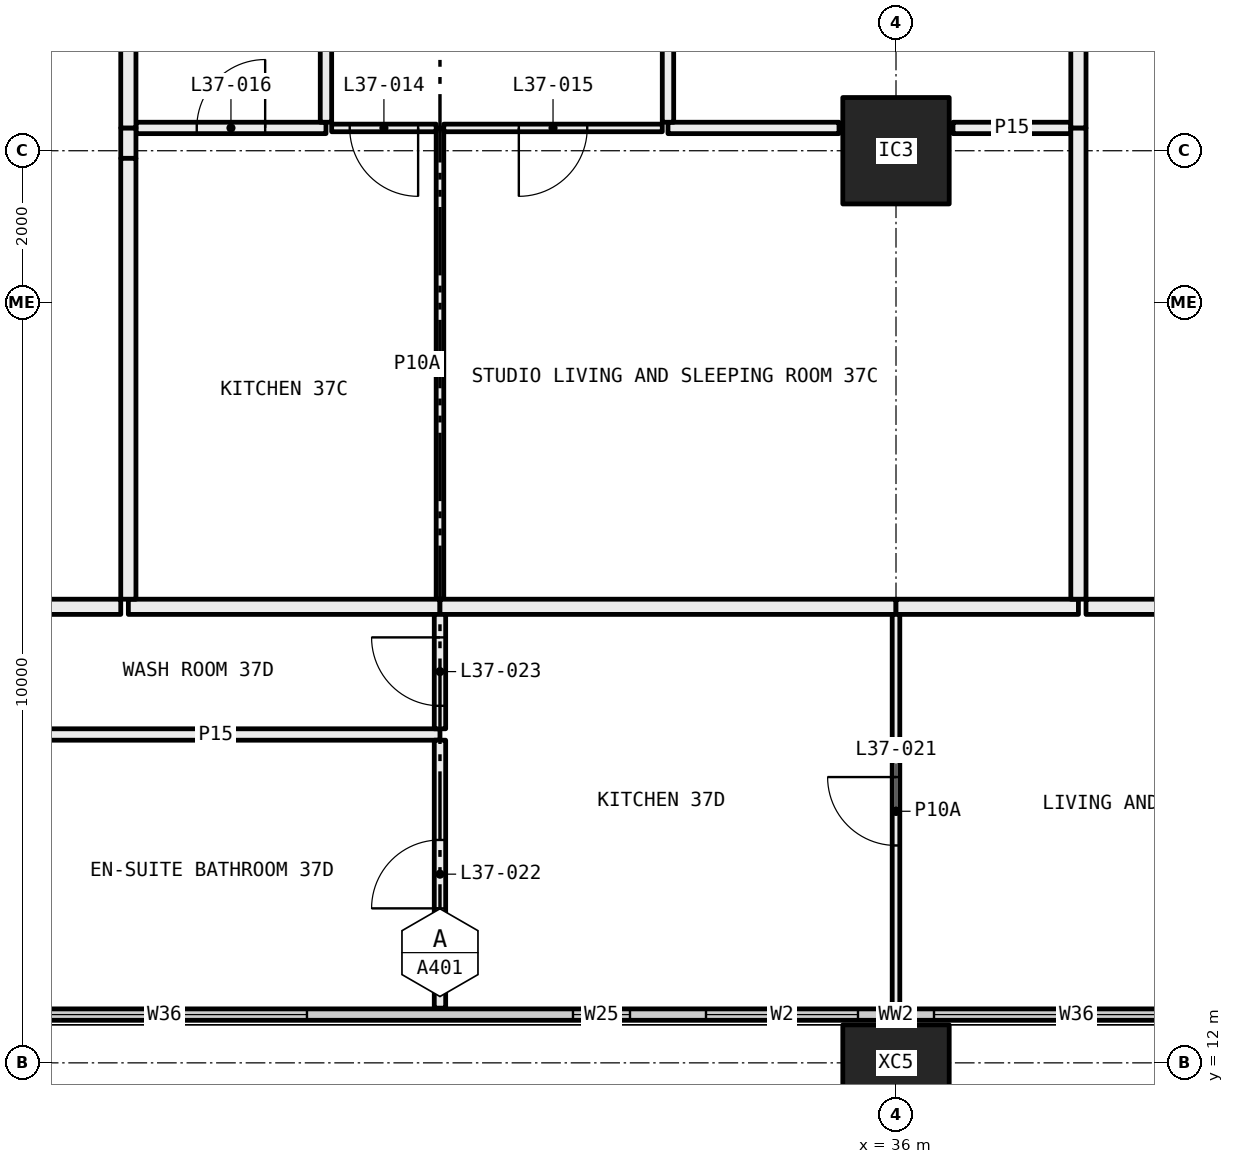
"""IFC4 building model, lengths in metres.
Left out: names, types, materials, properties, quantities, classifications, styles, units other than length and angle.
Written with IfcOpenShell. Run it as: python <this file> out.ifc"""

import sys

from ifc_helpers import new_model, si_unit, direction, frame, frame_2d, origin, origin_2d, place, context, subcontext, project, spatial, rectangle, hollow_rectangle, extrude, element, fill, save


model = new_model("IFC4")
c1 = context("Model", 3, precision=1e-05, world=origin(), true_north=direction((0.0, 1.0)))
c2 = subcontext(c1, "Body", "Model", "MODEL_VIEW")
j1 = project(units=[si_unit("LENGTHUNIT", "METRE"), si_unit("PLANEANGLEUNIT", "RADIAN")], contexts=[c1])
p1 = place(None, origin())
s1 = spatial("IfcSite", under=j1, at=p1, CompositionType="ELEMENT")
p2 = place(p1, origin())
s2 = spatial("IfcBuilding", under=s1, at=p2, CompositionType="ELEMENT")
p3 = place(p2, frame((0.0, 0.0, 141.45)))
s3 = spatial("IfcBuildingStorey", under=s2, at=p3, CompositionType="ELEMENT", Elevation=141.45)
p4 = place(p3, frame((36.0, 12.0, -0.4), z_axis=(0.0, 0.0, 1.0), x_axis=(1.0, 0.0, 0.0)))
e1 = element("IfcColumn", 1, at=p4, inside=s3, PredefinedType="COLUMN", context=c2, shape_type="SweptSolid", body=[
    extrude(hollow_rectangle(XDim=1.4, YDim=1.0, WallThickness=0.055, at=origin_2d()), origin(), (0.0, 0.0, 1.0), 3.45),
])
p5 = place(p3, frame((36.0, 24.0, 0.0), z_axis=(0.0, 0.0, 1.0), x_axis=(1.0, 0.0, 0.0)))
e2 = element("IfcColumn", 2, at=p5, inside=s3, PredefinedType="COLUMN", context=c2, shape_type="SweptSolid", body=[
    extrude(hollow_rectangle(XDim=1.4, YDim=1.4, WallThickness=0.06, at=origin_2d()), origin(), (0.0, 0.0, 1.0), 3.05),
])
p6 = place(p3, frame((6.56, 12.635, 0.0), z_axis=(0.0, 0.0, 1.0), x_axis=(1.0, 0.0, 0.0)))
e3 = element("IfcWall", 3, at=p6, inside=s3, PredefinedType="ELEMENTEDWALL", context=c2, shape_type="SweptSolid", body=[
    extrude(rectangle(XDim=58.88, YDim=0.15, at=frame_2d((29.44, 0.0))), origin(), (0.0, 0.0, 1.0), 3.05),
])
p7 = place(p6, frame((0.44, 0.0, 0.45)))
e4 = element("IfcOpeningElement", 4, at=p7, cuts=e3, PredefinedType="OPENING", context=c2, shape_type="SweptSolid", body=[
    extrude(rectangle(XDim=4.5, YDim=2.55, at=frame_2d((2.25, 1.275))), frame((0.0, 0.085, 0.0), z_axis=(0.0, -1.0, 0.0), x_axis=(1.0, 0.0, 0.0)), (0.0, 0.0, 1.0), 0.17),
])
p8 = place(p6, frame((5.94, 0.0, 0.45)))
e5 = element("IfcOpeningElement", 5, at=p8, cuts=e3, PredefinedType="OPENING", context=c2, shape_type="SweptSolid", body=[
    extrude(rectangle(XDim=3.75, YDim=2.55, at=frame_2d((1.875, 1.275))), frame((0.0, 0.085, 0.0), z_axis=(0.0, -1.0, 0.0), x_axis=(1.0, 0.0, 0.0)), (0.0, 0.0, 1.0), 0.17),
])
p9 = place(p6, frame((13.19, 0.0, 0.45)))
e6 = element("IfcOpeningElement", 6, at=p9, cuts=e3, PredefinedType="OPENING", context=c2, shape_type="SweptSolid", body=[
    extrude(rectangle(XDim=3.75, YDim=2.55, at=frame_2d((1.875, 1.275))), frame((0.0, 0.085, 0.0), z_axis=(0.0, -1.0, 0.0), x_axis=(1.0, 0.0, 0.0)), (0.0, 0.0, 1.0), 0.17),
])
p10 = place(p6, frame((17.94, 0.0, 0.45)))
e7 = element("IfcOpeningElement", 7, at=p10, cuts=e3, PredefinedType="OPENING", context=c2, shape_type="SweptSolid", body=[
    extrude(rectangle(XDim=3.75, YDim=2.55, at=frame_2d((1.875, 1.275))), frame((0.0, 0.085, 0.0), z_axis=(0.0, -1.0, 0.0), x_axis=(1.0, 0.0, 0.0)), (0.0, 0.0, 1.0), 0.17),
])
p11 = place(p6, frame((25.19, 0.0, 0.45)))
e8 = element("IfcOpeningElement", 8, at=p11, cuts=e3, PredefinedType="OPENING", context=c2, shape_type="SweptSolid", body=[
    extrude(rectangle(XDim=0.75, YDim=2.55, at=frame_2d((0.375, 1.275))), frame((0.0, 0.085, 0.0), z_axis=(0.0, -1.0, 0.0), x_axis=(1.0, 0.0, 0.0)), (0.0, 0.0, 1.0), 0.17),
])
p12 = place(p6, frame((26.94, 0.0, 0.45)))
e9 = element("IfcOpeningElement", 9, at=p12, cuts=e3, PredefinedType="OPENING", context=c2, shape_type="SweptSolid", body=[
    extrude(rectangle(XDim=2.0, YDim=2.55, at=frame_2d((1.0, 1.275))), frame((0.0, 0.085, 0.0), z_axis=(0.0, -1.0, 0.0), x_axis=(1.0, 0.0, 0.0)), (0.0, 0.0, 1.0), 0.17),
])
p13 = place(p6, frame((29.94, 0.0, 0.45)))
e10 = element("IfcOpeningElement", 10, at=p13, cuts=e3, PredefinedType="OPENING", context=c2, shape_type="SweptSolid", body=[
    extrude(rectangle(XDim=3.75, YDim=2.55, at=frame_2d((1.875, 1.275))), frame((0.0, 0.085, 0.0), z_axis=(0.0, -1.0, 0.0), x_axis=(1.0, 0.0, 0.0)), (0.0, 0.0, 1.0), 0.17),
])
p14 = place(p6, frame((37.19, 0.0, 0.45)))
e11 = element("IfcOpeningElement", 11, at=p14, cuts=e3, PredefinedType="OPENING", context=c2, shape_type="SweptSolid", body=[
    extrude(rectangle(XDim=3.75, YDim=2.55, at=frame_2d((1.875, 1.275))), frame((0.0, 0.085, 0.0), z_axis=(0.0, -1.0, 0.0), x_axis=(1.0, 0.0, 0.0)), (0.0, 0.0, 1.0), 0.17),
])
p15 = place(p6, frame((41.94, 0.0, 0.45)))
e12 = element("IfcOpeningElement", 12, at=p15, cuts=e3, PredefinedType="OPENING", context=c2, shape_type="SweptSolid", body=[
    extrude(rectangle(XDim=3.75, YDim=2.55, at=frame_2d((1.875, 1.275))), frame((0.0, 0.085, 0.0), z_axis=(0.0, -1.0, 0.0), x_axis=(1.0, 0.0, 0.0)), (0.0, 0.0, 1.0), 0.17),
])
p16 = place(p6, frame((49.19, 0.0, 0.45)))
e13 = element("IfcOpeningElement", 13, at=p16, cuts=e3, PredefinedType="OPENING", context=c2, shape_type="SweptSolid", body=[
    extrude(rectangle(XDim=0.75, YDim=2.55, at=frame_2d((0.375, 1.275))), frame((0.0, 0.085, 0.0), z_axis=(0.0, -1.0, 0.0), x_axis=(1.0, 0.0, 0.0)), (0.0, 0.0, 1.0), 0.17),
])
p17 = place(p6, frame((50.94, 0.0, 0.45)))
e14 = element("IfcOpeningElement", 14, at=p17, cuts=e3, PredefinedType="OPENING", context=c2, shape_type="SweptSolid", body=[
    extrude(rectangle(XDim=2.0, YDim=2.55, at=frame_2d((1.0, 1.275))), frame((0.0, 0.085, 0.0), z_axis=(0.0, -1.0, 0.0), x_axis=(1.0, 0.0, 0.0)), (0.0, 0.0, 1.0), 0.17),
])
p18 = place(p6, frame((53.94, 0.0, 0.45)))
e15 = element("IfcOpeningElement", 15, at=p18, cuts=e3, PredefinedType="OPENING", context=c2, shape_type="SweptSolid", body=[
    extrude(rectangle(XDim=4.5, YDim=2.55, at=frame_2d((2.25, 1.275))), frame((0.0, 0.085, 0.0), z_axis=(0.0, -1.0, 0.0), x_axis=(1.0, 0.0, 0.0)), (0.0, 0.0, 1.0), 0.17),
])
p19 = place(p3, frame((30.0, 18.1, 0.0), z_axis=(0.0, 0.0, 1.0), x_axis=(0.0, 1.0, 0.0)))
e16 = element("IfcWall", 16, at=p19, inside=s3, PredefinedType="PARTITIONING", context=c2, shape_type="SweptSolid", body=[
    extrude(rectangle(XDim=6.2, YDim=0.1, at=frame_2d((3.1, 0.0))), origin(), (0.0, 0.0, 1.0), 2.45),
])
p20 = place(p3, frame((28.5, 24.3, 0.0), z_axis=(0.0, 0.0, 1.0), x_axis=(-1.0, 0.0, 0.0)))
e17 = element("IfcWall", 17, at=p20, inside=s3, PredefinedType="PARTITIONING", context=c2, shape_type="SweptSolid", body=[
    extrude(rectangle(XDim=2.5, YDim=0.15, at=frame_2d((1.25, 0.0))), origin(), (0.0, 0.0, 1.0), 3.05),
])
p21 = place(p20, frame((0.8, 0.0, 0.0)))
e18 = element("IfcOpeningElement", 18, at=p21, cuts=e17, PredefinedType="OPENING", context=c2, shape_type="SweptSolid", body=[
    extrude(rectangle(XDim=0.9, YDim=2.1, at=frame_2d((0.45, 1.05))), frame((0.0, 0.085, 0.0), z_axis=(0.0, -1.0, 0.0), x_axis=(1.0, 0.0, 0.0)), (0.0, 0.0, 1.0), 0.17),
])
p22 = place(p3, frame((29.95, 24.3, 0.0), z_axis=(0.0, 0.0, 1.0), x_axis=(-1.0, 0.0, 0.0)))
e19 = element("IfcWall", 19, at=p22, inside=s3, PredefinedType="PARTITIONING", context=c2, shape_type="SweptSolid", body=[
    extrude(rectangle(XDim=1.375, YDim=0.1, at=frame_2d((0.688, 0.0))), origin(), (0.0, 0.0, 1.0), 3.05),
])
p23 = place(p22, frame((0.238, 0.0, 0.0)))
e20 = element("IfcOpeningElement", 20, at=p23, cuts=e19, PredefinedType="OPENING", context=c2, shape_type="SweptSolid", body=[
    extrude(rectangle(XDim=0.9, YDim=2.1, at=frame_2d((0.45, 1.05))), frame((0.0, 0.06, 0.0), z_axis=(0.0, -1.0, 0.0), x_axis=(1.0, 0.0, 0.0)), (0.0, 0.0, 1.0), 0.12),
])
p24 = place(p3, frame((25.9, 18.0, 0.0), z_axis=(0.0, 0.0, 1.0), x_axis=(1.0, 0.0, 0.0)))
e21 = element("IfcWall", 21, at=p24, inside=s3, PredefinedType="PARTITIONING", context=c2, shape_type="SweptSolid", body=[
    extrude(rectangle(XDim=4.1, YDim=0.2, at=frame_2d((2.05, 0.0))), origin(), (0.0, 0.0, 1.0), 3.05),
])
p25 = place(p3, frame((25.9, 24.3, 0.0), z_axis=(0.0, 0.0, 1.0), x_axis=(0.0, -1.0, 0.0)))
e22 = element("IfcWall", 22, at=p25, inside=s3, PredefinedType="PARTITIONING", context=c2, shape_type="SweptSolid", body=[
    extrude(rectangle(XDim=0.4, YDim=0.2, at=frame_2d((0.2, 0.0))), origin(), (0.0, 0.0, 1.0), 2.45),
])
p26 = place(p3, frame((25.9, 23.9, 0.0), z_axis=(0.0, 0.0, 1.0), x_axis=(0.0, -1.0, 0.0)))
e23 = element("IfcWall", 23, at=p26, inside=s3, PredefinedType="PARTITIONING", context=c2, shape_type="SweptSolid", body=[
    extrude(rectangle(XDim=5.8, YDim=0.2, at=frame_2d((2.9, 0.0))), origin(), (0.0, 0.0, 1.0), 3.05),
])
p27 = place(p3, frame((32.925, 24.3, 0.0), z_axis=(0.0, 0.0, 1.0), x_axis=(-1.0, 0.0, 0.0)))
e24 = element("IfcWall", 24, at=p27, inside=s3, PredefinedType="PARTITIONING", context=c2, shape_type="SweptSolid", body=[
    extrude(rectangle(XDim=2.875, YDim=0.1, at=frame_2d((1.438, 0.0))), origin(), (0.0, 0.0, 1.0), 3.05),
])
p28 = place(p27, frame((0.988, 0.0, 0.0)))
e25 = element("IfcOpeningElement", 25, at=p28, cuts=e24, PredefinedType="OPENING", context=c2, shape_type="SweptSolid", body=[
    extrude(rectangle(XDim=0.9, YDim=2.1, at=frame_2d((0.45, 1.05))), frame((0.0, 0.06, 0.0), z_axis=(0.0, -1.0, 0.0), x_axis=(1.0, 0.0, 0.0)), (0.0, 0.0, 1.0), 0.12),
])
p29 = place(p3, frame((35.25, 24.3, 0.0), z_axis=(0.0, 0.0, 1.0), x_axis=(-1.0, 0.0, 0.0)))
e26 = element("IfcWall", 26, at=p29, inside=s3, PredefinedType="PARTITIONING", context=c2, shape_type="SweptSolid", body=[
    extrude(rectangle(XDim=2.25, YDim=0.15, at=frame_2d((1.125, 0.0))), origin(), (0.0, 0.0, 1.0), 3.05),
])
p30 = place(p3, frame((38.3, 24.3, 0.0), z_axis=(0.0, 0.0, 1.0), x_axis=(-1.0, 0.0, 0.0)))
e27 = element("IfcWall", 27, at=p30, inside=s3, PredefinedType="PARTITIONING", context=c2, shape_type="SweptSolid", body=[
    extrude(rectangle(XDim=1.55, YDim=0.15, at=frame_2d((0.775, 0.0))), origin(), (0.0, 0.0, 1.0), 3.05),
])
p31 = place(p3, frame((30.0, 18.0, 0.0), z_axis=(0.0, 0.0, 1.0), x_axis=(1.0, 0.0, 0.0)))
e28 = element("IfcWall", 28, at=p31, inside=s3, PredefinedType="PARTITIONING", context=c2, shape_type="SweptSolid", body=[
    extrude(rectangle(XDim=6.0, YDim=0.2, at=frame_2d((3.0, 0.0))), origin(), (0.0, 0.0, 1.0), 2.45),
])
p32 = place(p3, frame((36.0, 18.0, 0.0), z_axis=(0.0, 0.0, 1.0), x_axis=(1.0, 0.0, 0.0)))
e29 = element("IfcWall", 29, at=p32, inside=s3, PredefinedType="PARTITIONING", context=c2, shape_type="SweptSolid", body=[
    extrude(rectangle(XDim=2.4, YDim=0.2, at=frame_2d((1.2, 0.0))), origin(), (0.0, 0.0, 1.0), 2.45),
])
p33 = place(p3, frame((38.4, 18.1, 0.0), z_axis=(0.0, 0.0, 1.0), x_axis=(0.0, 1.0, 0.0)))
e30 = element("IfcWall", 30, at=p33, inside=s3, PredefinedType="PARTITIONING", context=c2, shape_type="SweptSolid", body=[
    extrude(rectangle(XDim=6.2, YDim=0.2, at=frame_2d((3.1, 0.0))), origin(), (0.0, 0.0, 1.0), 2.45),
])
p34 = place(p3, frame((28.5, 24.375, 0.0), z_axis=(0.0, 0.0, 1.0), x_axis=(0.0, 1.0, 0.0)))
e31 = element("IfcWall", 31, at=p34, inside=s3, PredefinedType="PARTITIONING", context=c2, shape_type="SweptSolid", body=[
    extrude(rectangle(XDim=1.927, YDim=0.15, at=frame_2d((0.963, 0.0))), origin(), (0.0, 0.0, 1.0), 3.05),
])
p35 = place(p3, frame((25.9, 26.377, 0.0), z_axis=(0.0, 0.0, 1.0), x_axis=(0.0, -1.0, 0.0)))
e32 = element("IfcWall", 32, at=p35, inside=s3, PredefinedType="PARTITIONING", context=c2, shape_type="SweptSolid", body=[
    extrude(rectangle(XDim=2.077, YDim=0.2, at=frame_2d((1.039, 0.0))), origin(), (0.0, 0.0, 1.0), 3.05),
])
p36 = place(p3, frame((33.0, 24.375, 0.0), z_axis=(0.0, 0.0, 1.0), x_axis=(0.0, 1.0, 0.0)))
e33 = element("IfcWall", 33, at=p36, inside=s3, PredefinedType="PARTITIONING", context=c2, shape_type="SweptSolid", body=[
    extrude(rectangle(XDim=4.325, YDim=0.15, at=frame_2d((2.163, 0.0))), origin(), (0.0, 0.0, 1.0), 3.05),
])
p37 = place(p36, frame((1.712, 0.0, 0.0)))
e34 = element("IfcOpeningElement", 34, at=p37, cuts=e33, PredefinedType="OPENING", context=c2, shape_type="SweptSolid", body=[
    extrude(rectangle(XDim=0.9, YDim=2.1, at=frame_2d((0.45, 1.05))), frame((0.0, 0.085, 0.0), z_axis=(0.0, -1.0, 0.0), x_axis=(1.0, 0.0, 0.0)), (0.0, 0.0, 1.0), 0.17),
])
p38 = place(p3, frame((38.4, 24.3, 0.0), z_axis=(0.0, 0.0, 1.0), x_axis=(0.0, 1.0, 0.0)))
e35 = element("IfcWall", 35, at=p38, inside=s3, PredefinedType="PARTITIONING", context=c2, shape_type="SweptSolid", body=[
    extrude(rectangle(XDim=4.5, YDim=0.2, at=frame_2d((2.25, 0.0))), origin(), (0.0, 0.0, 1.0), 3.05),
])
p39 = place(p3, frame((30.0, 16.32, 0.0), z_axis=(0.0, 0.0, 1.0), x_axis=(-1.0, 0.0, 0.0)))
e36 = element("IfcWall", 36, at=p39, inside=s3, PredefinedType="PARTITIONING", context=c2, shape_type="SweptSolid", body=[
    extrude(rectangle(XDim=5.9, YDim=0.15, at=frame_2d((2.95, 0.0))), origin(), (0.0, 0.0, 1.0), 3.05),
])
p40 = place(p3, frame((30.0, 12.72, 0.0), z_axis=(0.0, 0.0, 1.0), x_axis=(0.0, 1.0, 0.0)))
e37 = element("IfcWall", 37, at=p40, inside=s3, PredefinedType="PARTITIONING", context=c2, shape_type="SweptSolid", body=[
    extrude(rectangle(XDim=3.525, YDim=0.15, at=frame_2d((1.763, 0.0))), origin(), (0.0, 0.0, 1.0), 3.05),
])
p41 = place(p40, frame((1.312, 0.0, 0.0)))
e38 = element("IfcOpeningElement", 38, at=p41, cuts=e37, PredefinedType="OPENING", context=c2, shape_type="SweptSolid", body=[
    extrude(rectangle(XDim=0.9, YDim=2.1, at=frame_2d((0.45, 1.05))), frame((0.0, 0.085, 0.0), z_axis=(0.0, -1.0, 0.0), x_axis=(1.0, 0.0, 0.0)), (0.0, 0.0, 1.0), 0.17),
])
p42 = place(p3, frame((30.0, 16.395, 0.0), z_axis=(0.0, 0.0, 1.0), x_axis=(0.0, 1.0, 0.0)))
e39 = element("IfcWall", 39, at=p42, inside=s3, PredefinedType="PARTITIONING", context=c2, shape_type="SweptSolid", body=[
    extrude(rectangle(XDim=1.505, YDim=0.15, at=frame_2d((0.752, 0.0))), origin(), (0.0, 0.0, 1.0), 3.05),
])
p43 = place(p42, frame((0.302, 0.0, 0.0)))
e40 = element("IfcOpeningElement", 40, at=p43, cuts=e39, PredefinedType="OPENING", context=c2, shape_type="SweptSolid", body=[
    extrude(rectangle(XDim=0.9, YDim=2.1, at=frame_2d((0.45, 1.05))), frame((0.0, 0.085, 0.0), z_axis=(0.0, -1.0, 0.0), x_axis=(1.0, 0.0, 0.0)), (0.0, 0.0, 1.0), 0.17),
])
p44 = place(p3, frame((25.8, 18.0, 0.0), z_axis=(0.0, 0.0, 1.0), x_axis=(-1.0, 0.0, 0.0)))
e41 = element("IfcWall", 41, at=p44, inside=s3, PredefinedType="PARTITIONING", context=c2, shape_type="SweptSolid", body=[
    extrude(rectangle(XDim=1.7, YDim=0.2, at=frame_2d((0.85, 0.0))), origin(), (0.0, 0.0, 1.0), 3.05),
])
p45 = place(p3, frame((36.0, 12.72, 0.0), z_axis=(0.0, 0.0, 1.0), x_axis=(0.0, 1.0, 0.0)))
e42 = element("IfcWall", 42, at=p45, inside=s3, PredefinedType="PARTITIONING", context=c2, shape_type="SweptSolid", body=[
    extrude(rectangle(XDim=5.18, YDim=0.1, at=frame_2d((2.59, 0.0))), origin(), (0.0, 0.0, 1.0), 2.45),
])
p46 = place(p45, frame((2.14, 0.0, 0.0)))
e43 = element("IfcOpeningElement", 43, at=p46, cuts=e42, PredefinedType="OPENING", context=c2, shape_type="SweptSolid", body=[
    extrude(rectangle(XDim=0.9, YDim=2.1, at=frame_2d((0.45, 1.05))), frame((0.0, 0.06, 0.0), z_axis=(0.0, -1.0, 0.0), x_axis=(1.0, 0.0, 0.0)), (0.0, 0.0, 1.0), 0.12),
])
p47 = place(p3, frame((40.8, 18.0, 0.0), z_axis=(0.0, 0.0, 1.0), x_axis=(-1.0, 0.0, 0.0)))
e44 = element("IfcWall", 44, at=p47, inside=s3, PredefinedType="PARTITIONING", context=c2, shape_type="SweptSolid", body=[
    extrude(rectangle(XDim=2.3, YDim=0.2, at=frame_2d((1.15, 0.0))), origin(), (0.0, 0.0, 1.0), 3.05),
])
p48 = place(p10, origin())
e45 = element("IfcWindow", 45, at=p48, inside=s3, PartitioningType="SINGLE_PANEL", PredefinedType="WINDOW", context=c2, shape_type="SweptSolid", body=[
    extrude(rectangle(XDim=3.75, YDim=2.55, at=frame_2d((1.875, 1.275))), frame((0.0, 0.03, 0.0), z_axis=(0.0, -1.0, 0.0), x_axis=(1.0, 0.0, 0.0)), (0.0, 0.0, 1.0), 0.06),
])
fill(e7, e45)
p49 = place(p11, origin())
e46 = element("IfcWindow", 46, at=p49, inside=s3, PartitioningType="SINGLE_PANEL", PredefinedType="WINDOW", context=c2, shape_type="SweptSolid", body=[
    extrude(rectangle(XDim=0.75, YDim=2.55, at=frame_2d((0.375, 1.275))), frame((0.0, 0.03, 0.0), z_axis=(0.0, -1.0, 0.0), x_axis=(1.0, 0.0, 0.0)), (0.0, 0.0, 1.0), 0.06),
])
fill(e8, e46)
p50 = place(p12, origin())
e47 = element("IfcWindow", 47, at=p50, inside=s3, PartitioningType="SINGLE_PANEL", PredefinedType="WINDOW", context=c2, shape_type="SweptSolid", body=[
    extrude(rectangle(XDim=2.0, YDim=2.55, at=frame_2d((1.0, 1.275))), frame((0.0, 0.03, 0.0), z_axis=(0.0, -1.0, 0.0), x_axis=(1.0, 0.0, 0.0)), (0.0, 0.0, 1.0), 0.06),
])
fill(e9, e47)
p51 = place(p13, origin())
e48 = element("IfcWindow", 48, at=p51, inside=s3, PartitioningType="SINGLE_PANEL", PredefinedType="WINDOW", context=c2, shape_type="SweptSolid", body=[
    extrude(rectangle(XDim=3.75, YDim=2.55, at=frame_2d((1.875, 1.275))), frame((0.0, 0.03, 0.0), z_axis=(0.0, -1.0, 0.0), x_axis=(1.0, 0.0, 0.0)), (0.0, 0.0, 1.0), 0.06),
])
fill(e10, e48)
p52 = place(p23, origin())
e49 = element("IfcDoor", 49, at=p52, inside=s3, OperationType="SINGLE_SWING_RIGHT", PredefinedType="DOOR", context=c2, shape_type="SweptSolid", body=[
    extrude(rectangle(XDim=0.9, YDim=2.1, at=frame_2d((0.45, 1.05))), frame((0.0, 0.025, 0.0), z_axis=(0.0, -1.0, 0.0), x_axis=(1.0, 0.0, 0.0)), (0.0, 0.0, 1.0), 0.05),
])
fill(e20, e49)
p53 = place(p28, origin())
e50 = element("IfcDoor", 50, at=p53, inside=s3, OperationType="SINGLE_SWING_LEFT", PredefinedType="DOOR", context=c2, shape_type="SweptSolid", body=[
    extrude(rectangle(XDim=0.9, YDim=2.1, at=frame_2d((0.45, 1.05))), frame((0.0, 0.025, 0.0), z_axis=(0.0, -1.0, 0.0), x_axis=(1.0, 0.0, 0.0)), (0.0, 0.0, 1.0), 0.05),
])
fill(e25, e50)
p54 = place(p21, frame((0.9, 0.0, 0.0), x_axis=(-1.0, 0.0, 0.0)))
e51 = element("IfcDoor", 51, at=p54, inside=s3, OperationType="SINGLE_SWING_LEFT", PredefinedType="DOOR", context=c2, shape_type="SweptSolid", body=[
    extrude(rectangle(XDim=0.9, YDim=2.1, at=frame_2d((0.45, 1.05))), frame((0.0, 0.025, 0.0), z_axis=(0.0, -1.0, 0.0), x_axis=(1.0, 0.0, 0.0)), (0.0, 0.0, 1.0), 0.05),
])
fill(e18, e51)
p55 = place(p46, origin())
e52 = element("IfcDoor", 52, at=p55, inside=s3, OperationType="SINGLE_SWING_LEFT", PredefinedType="DOOR", context=c2, shape_type="SweptSolid", body=[
    extrude(rectangle(XDim=0.9, YDim=2.1, at=frame_2d((0.45, 1.05))), frame((0.0, 0.025, 0.0), z_axis=(0.0, -1.0, 0.0), x_axis=(1.0, 0.0, 0.0)), (0.0, 0.0, 1.0), 0.05),
])
fill(e43, e52)
p56 = place(p41, origin())
e53 = element("IfcDoor", 53, at=p56, inside=s3, OperationType="SINGLE_SWING_RIGHT", PredefinedType="DOOR", context=c2, shape_type="SweptSolid", body=[
    extrude(rectangle(XDim=0.9, YDim=2.1, at=frame_2d((0.45, 1.05))), frame((0.0, 0.025, 0.0), z_axis=(0.0, -1.0, 0.0), x_axis=(1.0, 0.0, 0.0)), (0.0, 0.0, 1.0), 0.05),
])
fill(e38, e53)
p57 = place(p43, origin())
e54 = element("IfcDoor", 54, at=p57, inside=s3, OperationType="SINGLE_SWING_LEFT", PredefinedType="DOOR", context=c2, shape_type="SweptSolid", body=[
    extrude(rectangle(XDim=0.9, YDim=2.1, at=frame_2d((0.45, 1.05))), frame((0.0, 0.025, 0.0), z_axis=(0.0, -1.0, 0.0), x_axis=(1.0, 0.0, 0.0)), (0.0, 0.0, 1.0), 0.05),
])
fill(e40, e54)
save(model, sys.argv[1])
